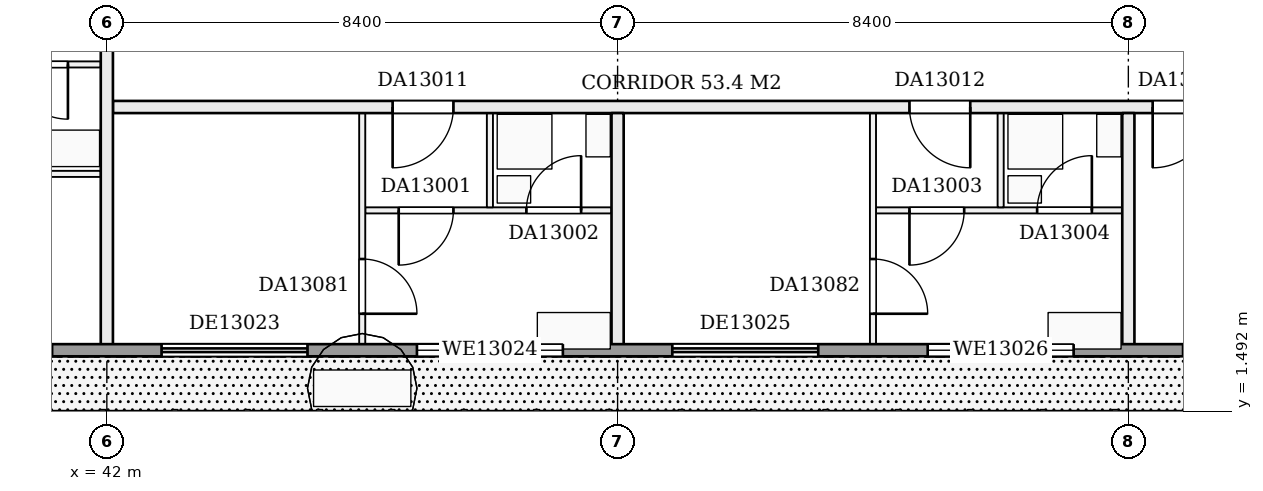
"""IFC4 building model, lengths in metres.
Left out: names, types, materials, properties, quantities, classifications, styles, units other than length and angle.
Written with IfcOpenShell. Run it as: python <this file> out.ifc"""

import sys

from ifc_helpers import new_model, si_unit, direction, frame, frame_2d, origin, place, context, subcontext, project, spatial, rectangle, extrude, element, fill, save


model = new_model("IFC4")
c1 = context("Model", 3, precision=1e-05, world=origin(), true_north=direction((0.0, 1.0)))
c2 = subcontext(c1, "Body", "Model", "MODEL_VIEW")
j1 = project(units=[si_unit("LENGTHUNIT", "METRE"), si_unit("PLANEANGLEUNIT", "RADIAN")], contexts=[c1])
p1 = place(None, origin())
s1 = spatial("IfcSite", under=j1, at=p1, CompositionType="ELEMENT")
p2 = place(p1, origin())
s2 = spatial("IfcBuilding", under=s1, at=p2, CompositionType="ELEMENT")
p3 = place(p2, frame((0.0, 0.0, 56.7)))
s3 = spatial("IfcBuildingStorey", under=s2, at=p3, CompositionType="ELEMENT", Elevation=56.7)
p4 = place(p3, frame((46.25, 4.8, 0.0), z_axis=(0.0, 0.0, 1.0), x_axis=(1.0, 0.0, 0.0)))
e1 = element("IfcWall", 1, at=p4, inside=s3, PredefinedType="PARTITIONING", context=c2, shape_type="SweptSolid", body=[
    extrude(rectangle(XDim=4.05, YDim=0.1, at=frame_2d((2.025, 0.0))), origin(), (0.0, 0.0, 1.0), 3.22),
])
p5 = place(p4, frame((0.55, 0.0, 0.0)))
e2 = element("IfcOpeningElement", 2, at=p5, cuts=e1, PredefinedType="OPENING", context=c2, shape_type="SweptSolid", body=[
    extrude(rectangle(XDim=0.9, YDim=2.1, at=frame_2d((0.45, 1.05))), frame((0.0, 0.06, 0.0), z_axis=(0.0, -1.0, 0.0), x_axis=(1.0, 0.0, 0.0)), (0.0, 0.0, 1.0), 0.12),
])
p6 = place(p4, frame((2.65, 0.0, 0.0)))
e3 = element("IfcOpeningElement", 3, at=p6, cuts=e1, PredefinedType="OPENING", context=c2, shape_type="SweptSolid", body=[
    extrude(rectangle(XDim=0.9, YDim=2.1, at=frame_2d((0.45, 1.05))), frame((0.0, 0.06, 0.0), z_axis=(0.0, -1.0, 0.0), x_axis=(1.0, 0.0, 0.0)), (0.0, 0.0, 1.0), 0.12),
])
p7 = place(p3, frame((54.65, 4.8, 0.0), z_axis=(0.0, 0.0, 1.0), x_axis=(1.0, 0.0, 0.0)))
e4 = element("IfcWall", 4, at=p7, inside=s3, PredefinedType="PARTITIONING", context=c2, shape_type="SweptSolid", body=[
    extrude(rectangle(XDim=4.05, YDim=0.1, at=frame_2d((2.025, 0.0))), origin(), (0.0, 0.0, 1.0), 3.22),
])
p8 = place(p7, frame((0.55, 0.0, 0.0)))
e5 = element("IfcOpeningElement", 5, at=p8, cuts=e4, PredefinedType="OPENING", context=c2, shape_type="SweptSolid", body=[
    extrude(rectangle(XDim=0.9, YDim=2.1, at=frame_2d((0.45, 1.05))), frame((0.0, 0.06, 0.0), z_axis=(0.0, -1.0, 0.0), x_axis=(1.0, 0.0, 0.0)), (0.0, 0.0, 1.0), 0.12),
])
p9 = place(p7, frame((2.65, 0.0, 0.0)))
e6 = element("IfcOpeningElement", 6, at=p9, cuts=e4, PredefinedType="OPENING", context=c2, shape_type="SweptSolid", body=[
    extrude(rectangle(XDim=0.9, YDim=2.1, at=frame_2d((0.45, 1.05))), frame((0.0, 0.06, 0.0), z_axis=(0.0, -1.0, 0.0), x_axis=(1.0, 0.0, 0.0)), (0.0, 0.0, 1.0), 0.12),
])
p10 = place(p3, frame((37.9, 5.4, 0.0), z_axis=(0.0, 0.0, 1.0), x_axis=(1.0, 0.0, 0.0)))
e7 = element("IfcWall", 7, at=p10, inside=s3, PredefinedType="PARTITIONING", context=c2, shape_type="SweptSolid", body=[
    extrude(rectangle(XDim=4.0, YDim=0.1, at=frame_2d((2.0, 0.0))), origin(), (0.0, 0.0, 1.0), 3.22),
])
p11 = place(p10, frame((1.5, 0.0, 0.0)))
e8 = element("IfcOpeningElement", 8, at=p11, cuts=e7, PredefinedType="OPENING", context=c2, shape_type="SweptSolid", body=[
    extrude(rectangle(XDim=0.9, YDim=2.1, at=frame_2d((0.45, 1.05))), frame((0.0, 0.06, 0.0), z_axis=(0.0, -1.0, 0.0), x_axis=(1.0, 0.0, 0.0)), (0.0, 0.0, 1.0), 0.12),
])
p12 = place(p3, frame((42.1, 6.5, 0.0), z_axis=(0.0, 0.0, 1.0), x_axis=(1.0, 0.0, 0.0)))
e9 = element("IfcWall", 9, at=p12, inside=s3, PredefinedType="PARTITIONING", context=c2, shape_type="SweptSolid", body=[
    extrude(rectangle(XDim=18.7, YDim=0.2, at=frame_2d((9.35, 0.0))), origin(), (0.0, 0.0, 1.0), 3.22),
])
p13 = place(p12, frame((4.6, 0.0, 0.0)))
e10 = element("IfcOpeningElement", 10, at=p13, cuts=e9, PredefinedType="OPENING", context=c2, shape_type="SweptSolid", body=[
    extrude(rectangle(XDim=1.0, YDim=2.1, at=frame_2d((0.5, 1.05))), frame((0.0, 0.11, 0.0), z_axis=(0.0, -1.0, 0.0), x_axis=(1.0, 0.0, 0.0)), (0.0, 0.0, 1.0), 0.22),
])
p14 = place(p12, frame((13.1, 0.0, 0.0)))
e11 = element("IfcOpeningElement", 11, at=p14, cuts=e9, PredefinedType="OPENING", context=c2, shape_type="SweptSolid", body=[
    extrude(rectangle(XDim=1.0, YDim=2.1, at=frame_2d((0.5, 1.05))), frame((0.0, 0.11, 0.0), z_axis=(0.0, -1.0, 0.0), x_axis=(1.0, 0.0, 0.0)), (0.0, 0.0, 1.0), 0.22),
])
p15 = place(p12, frame((17.1, 0.0, 0.0)))
e12 = element("IfcOpeningElement", 12, at=p15, cuts=e9, PredefinedType="OPENING", context=c2, shape_type="SweptSolid", body=[
    extrude(rectangle(XDim=1.0, YDim=2.1, at=frame_2d((0.5, 1.05))), frame((0.0, 0.11, 0.0), z_axis=(0.0, -1.0, 0.0), x_axis=(1.0, 0.0, 0.0)), (0.0, 0.0, 1.0), 0.22),
])
p16 = place(p3, frame((37.9, 7.2, 0.0), z_axis=(0.0, 0.0, 1.0), x_axis=(1.0, 0.0, 0.0)))
e13 = element("IfcWall", 13, at=p16, inside=s3, PredefinedType="PARTITIONING", context=c2, shape_type="SweptSolid", body=[
    extrude(rectangle(XDim=4.0, YDim=0.1, at=frame_2d((2.0, 0.0))), origin(), (0.0, 0.0, 1.0), 3.22),
])
p17 = place(p16, frame((0.4, 0.0, 0.0)))
e14 = element("IfcOpeningElement", 14, at=p17, cuts=e13, PredefinedType="OPENING", context=c2, shape_type="SweptSolid", body=[
    extrude(rectangle(XDim=0.9, YDim=2.1, at=frame_2d((0.45, 1.05))), frame((0.0, 0.06, 0.0), z_axis=(0.0, -1.0, 0.0), x_axis=(1.0, 0.0, 0.0)), (0.0, 0.0, 1.0), 0.12),
])
p18 = place(p16, frame((2.56, 0.0, 0.0)))
e15 = element("IfcOpeningElement", 15, at=p18, cuts=e13, PredefinedType="OPENING", context=c2, shape_type="SweptSolid", body=[
    extrude(rectangle(XDim=0.9, YDim=2.1, at=frame_2d((0.45, 1.05))), frame((0.0, 0.06, 0.0), z_axis=(0.0, -1.0, 0.0), x_axis=(1.0, 0.0, 0.0)), (0.0, 0.0, 1.0), 0.12),
])
p19 = place(p3, frame((42.0, 2.5, 0.0), z_axis=(0.0, 0.0, 1.0), x_axis=(0.0, 1.0, 0.0)))
e16 = element("IfcWall", 16, at=p19, inside=s3, PredefinedType="PARTITIONING", context=c2, shape_type="SweptSolid", body=[
    extrude(rectangle(XDim=5.9, YDim=0.2, at=frame_2d((2.95, 0.0))), origin(), (0.0, 0.0, 1.0), 3.22),
])
p20 = place(p3, frame((46.2, 2.5, 0.0), z_axis=(0.0, 0.0, 1.0), x_axis=(0.0, 1.0, 0.0)))
e17 = element("IfcWall", 17, at=p20, inside=s3, PredefinedType="PARTITIONING", context=c2, shape_type="SweptSolid", body=[
    extrude(rectangle(XDim=3.9, YDim=0.1, at=frame_2d((1.95, 0.0))), origin(), (0.0, 0.0, 1.0), 3.22),
])
p21 = place(p20, frame((0.6, 0.0, 0.0)))
e18 = element("IfcOpeningElement", 18, at=p21, cuts=e17, PredefinedType="OPENING", context=c2, shape_type="SweptSolid", body=[
    extrude(rectangle(XDim=0.9, YDim=2.1, at=frame_2d((0.45, 1.05))), frame((0.0, 0.06, 0.0), z_axis=(0.0, -1.0, 0.0), x_axis=(1.0, 0.0, 0.0)), (0.0, 0.0, 1.0), 0.12),
])
p22 = place(p3, frame((48.3, 4.85, 0.0), z_axis=(0.0, 0.0, 1.0), x_axis=(0.0, 1.0, 0.0)))
e19 = element("IfcWall", 19, at=p22, inside=s3, PredefinedType="PARTITIONING", context=c2, shape_type="SweptSolid", body=[
    extrude(rectangle(XDim=1.55, YDim=0.1, at=frame_2d((0.775, 0.0))), origin(), (0.0, 0.0, 1.0), 3.22),
])
p23 = place(p3, frame((50.4, 2.5, 0.0), z_axis=(0.0, 0.0, 1.0), x_axis=(0.0, 1.0, 0.0)))
e20 = element("IfcWall", 20, at=p23, inside=s3, PredefinedType="PARTITIONING", context=c2, shape_type="SweptSolid", body=[
    extrude(rectangle(XDim=3.9, YDim=0.2, at=frame_2d((1.95, 0.0))), origin(), (0.0, 0.0, 1.0), 3.22),
])
p24 = place(p3, frame((54.6, 2.5, 0.0), z_axis=(0.0, 0.0, 1.0), x_axis=(0.0, 1.0, 0.0)))
e21 = element("IfcWall", 21, at=p24, inside=s3, PredefinedType="PARTITIONING", context=c2, shape_type="SweptSolid", body=[
    extrude(rectangle(XDim=3.9, YDim=0.1, at=frame_2d((1.95, 0.0))), origin(), (0.0, 0.0, 1.0), 3.22),
])
p25 = place(p24, frame((0.6, 0.0, 0.0)))
e22 = element("IfcOpeningElement", 22, at=p25, cuts=e21, PredefinedType="OPENING", context=c2, shape_type="SweptSolid", body=[
    extrude(rectangle(XDim=0.9, YDim=2.1, at=frame_2d((0.45, 1.05))), frame((0.0, 0.06, 0.0), z_axis=(0.0, -1.0, 0.0), x_axis=(1.0, 0.0, 0.0)), (0.0, 0.0, 1.0), 0.12),
])
p26 = place(p3, frame((56.7, 4.85, 0.0), z_axis=(0.0, 0.0, 1.0), x_axis=(0.0, 1.0, 0.0)))
e23 = element("IfcWall", 23, at=p26, inside=s3, PredefinedType="PARTITIONING", context=c2, shape_type="SweptSolid", body=[
    extrude(rectangle(XDim=1.55, YDim=0.1, at=frame_2d((0.775, 0.0))), origin(), (0.0, 0.0, 1.0), 3.22),
])
p27 = place(p3, frame((58.8, 2.5, 0.0), z_axis=(0.0, 0.0, 1.0), x_axis=(0.0, 1.0, 0.0)))
e24 = element("IfcWall", 24, at=p27, inside=s3, PredefinedType="PARTITIONING", context=c2, shape_type="SweptSolid", body=[
    extrude(rectangle(XDim=3.9, YDim=0.2, at=frame_2d((1.95, 0.0))), origin(), (0.0, 0.0, 1.0), 3.22),
])
p28 = place(p3, frame((4.8, 2.5, 0.0), z_axis=(0.0, 0.0, 1.0), x_axis=(1.0, 0.0, 0.0)))
e25 = element("IfcWall", 25, at=p28, inside=s3, PredefinedType="SOLIDWALL", context=c2, shape_type="SweptSolid", body=[
    extrude(rectangle(XDim=57.6, YDim=0.2, at=frame_2d((28.8, 0.0))), origin(), (0.0, 0.0, 1.0), 3.22),
])
p29 = place(p28, frame((0.3, 0.0, 0.0)))
e26 = element("IfcOpeningElement", 26, at=p29, cuts=e25, PredefinedType="OPENING", context=c2, shape_type="SweptSolid", body=[
    extrude(rectangle(XDim=2.4, YDim=2.2, at=frame_2d((1.2, 1.1))), frame((0.0, 0.11, 0.0), z_axis=(0.0, -1.0, 0.0), x_axis=(1.0, 0.0, 0.0)), (0.0, 0.0, 1.0), 0.22),
])
p30 = place(p28, frame((4.5, 0.0, 0.0)))
e27 = element("IfcOpeningElement", 27, at=p30, cuts=e25, PredefinedType="OPENING", context=c2, shape_type="SweptSolid", body=[
    extrude(rectangle(XDim=2.4, YDim=2.2, at=frame_2d((1.2, 1.1))), frame((0.0, 0.11, 0.0), z_axis=(0.0, -1.0, 0.0), x_axis=(1.0, 0.0, 0.0)), (0.0, 0.0, 1.0), 0.22),
])
p31 = place(p28, frame((8.7, 0.0, 0.0)))
e28 = element("IfcOpeningElement", 28, at=p31, cuts=e25, PredefinedType="OPENING", context=c2, shape_type="SweptSolid", body=[
    extrude(rectangle(XDim=2.4, YDim=2.2, at=frame_2d((1.2, 1.1))), frame((0.0, 0.11, 0.0), z_axis=(0.0, -1.0, 0.0), x_axis=(1.0, 0.0, 0.0)), (0.0, 0.0, 1.0), 0.22),
])
p32 = place(p28, frame((12.9, 0.0, 0.0)))
e29 = element("IfcOpeningElement", 29, at=p32, cuts=e25, PredefinedType="OPENING", context=c2, shape_type="SweptSolid", body=[
    extrude(rectangle(XDim=2.4, YDim=2.2, at=frame_2d((1.2, 1.1))), frame((0.0, 0.11, 0.0), z_axis=(0.0, -1.0, 0.0), x_axis=(1.0, 0.0, 0.0)), (0.0, 0.0, 1.0), 0.22),
])
p33 = place(p28, frame((17.1, 0.0, 0.9)))
e30 = element("IfcOpeningElement", 30, at=p33, cuts=e25, PredefinedType="OPENING", context=c2, shape_type="SweptSolid", body=[
    extrude(rectangle(XDim=2.4, YDim=1.5, at=frame_2d((1.2, 0.75))), frame((0.0, 0.11, 0.0), z_axis=(0.0, -1.0, 0.0), x_axis=(1.0, 0.0, 0.0)), (0.0, 0.0, 1.0), 0.22),
])
p34 = place(p28, frame((21.3, 0.0, 0.0)))
e31 = element("IfcOpeningElement", 31, at=p34, cuts=e25, PredefinedType="OPENING", context=c2, shape_type="SweptSolid", body=[
    extrude(rectangle(XDim=2.4, YDim=2.2, at=frame_2d((1.2, 1.1))), frame((0.0, 0.11, 0.0), z_axis=(0.0, -1.0, 0.0), x_axis=(1.0, 0.0, 0.0)), (0.0, 0.0, 1.0), 0.22),
])
p35 = place(p28, frame((25.5, 0.0, 0.0)))
e32 = element("IfcOpeningElement", 32, at=p35, cuts=e25, PredefinedType="OPENING", context=c2, shape_type="SweptSolid", body=[
    extrude(rectangle(XDim=2.4, YDim=2.2, at=frame_2d((1.2, 1.1))), frame((0.0, 0.11, 0.0), z_axis=(0.0, -1.0, 0.0), x_axis=(1.0, 0.0, 0.0)), (0.0, 0.0, 1.0), 0.22),
])
p36 = place(p28, frame((29.7, 0.0, 0.9)))
e33 = element("IfcOpeningElement", 33, at=p36, cuts=e25, PredefinedType="OPENING", context=c2, shape_type="SweptSolid", body=[
    extrude(rectangle(XDim=2.4, YDim=1.5, at=frame_2d((1.2, 0.75))), frame((0.0, 0.11, 0.0), z_axis=(0.0, -1.0, 0.0), x_axis=(1.0, 0.0, 0.0)), (0.0, 0.0, 1.0), 0.22),
])
p37 = place(p28, frame((33.9, 0.0, 0.0)))
e34 = element("IfcOpeningElement", 34, at=p37, cuts=e25, PredefinedType="OPENING", context=c2, shape_type="SweptSolid", body=[
    extrude(rectangle(XDim=2.4, YDim=2.2, at=frame_2d((1.2, 1.1))), frame((0.0, 0.11, 0.0), z_axis=(0.0, -1.0, 0.0), x_axis=(1.0, 0.0, 0.0)), (0.0, 0.0, 1.0), 0.22),
])
p38 = place(p28, frame((38.1, 0.0, 0.0)))
e35 = element("IfcOpeningElement", 35, at=p38, cuts=e25, PredefinedType="OPENING", context=c2, shape_type="SweptSolid", body=[
    extrude(rectangle(XDim=2.4, YDim=2.2, at=frame_2d((1.2, 1.1))), frame((0.0, 0.11, 0.0), z_axis=(0.0, -1.0, 0.0), x_axis=(1.0, 0.0, 0.0)), (0.0, 0.0, 1.0), 0.22),
])
p39 = place(p28, frame((42.3, 0.0, 0.9)))
e36 = element("IfcOpeningElement", 36, at=p39, cuts=e25, PredefinedType="OPENING", context=c2, shape_type="SweptSolid", body=[
    extrude(rectangle(XDim=2.4, YDim=1.5, at=frame_2d((1.2, 0.75))), frame((0.0, 0.11, 0.0), z_axis=(0.0, -1.0, 0.0), x_axis=(1.0, 0.0, 0.0)), (0.0, 0.0, 1.0), 0.22),
])
p40 = place(p28, frame((46.5, 0.0, 0.0)))
e37 = element("IfcOpeningElement", 37, at=p40, cuts=e25, PredefinedType="OPENING", context=c2, shape_type="SweptSolid", body=[
    extrude(rectangle(XDim=2.4, YDim=2.2, at=frame_2d((1.2, 1.1))), frame((0.0, 0.11, 0.0), z_axis=(0.0, -1.0, 0.0), x_axis=(1.0, 0.0, 0.0)), (0.0, 0.0, 1.0), 0.22),
])
p41 = place(p28, frame((50.7, 0.0, 0.9)))
e38 = element("IfcOpeningElement", 38, at=p41, cuts=e25, PredefinedType="OPENING", context=c2, shape_type="SweptSolid", body=[
    extrude(rectangle(XDim=2.4, YDim=1.5, at=frame_2d((1.2, 0.75))), frame((0.0, 0.11, 0.0), z_axis=(0.0, -1.0, 0.0), x_axis=(1.0, 0.0, 0.0)), (0.0, 0.0, 1.0), 0.22),
])
p42 = place(p28, frame((54.9, 0.0, 0.9)))
e39 = element("IfcOpeningElement", 39, at=p42, cuts=e25, PredefinedType="OPENING", context=c2, shape_type="SweptSolid", body=[
    extrude(rectangle(XDim=2.4, YDim=1.5, at=frame_2d((1.2, 0.75))), frame((0.0, 0.11, 0.0), z_axis=(0.0, -1.0, 0.0), x_axis=(1.0, 0.0, 0.0)), (0.0, 0.0, 1.0), 0.22),
])
p43 = place(p5, frame((0.9, 0.0, 0.0), z_axis=(0.0, 0.0, 1.0), x_axis=(-1.0, 0.0, 0.0)))
e40 = element("IfcDoor", 40, at=p43, inside=s3, OperationType="SINGLE_SWING_RIGHT", PredefinedType="DOOR", context=c2, shape_type="SweptSolid", body=[
    extrude(rectangle(XDim=0.9, YDim=2.1, at=frame_2d((0.45, 1.05))), frame((0.0, 0.025, 0.0), z_axis=(0.0, -1.0, 0.0), x_axis=(1.0, 0.0, 0.0)), (0.0, 0.0, 1.0), 0.05),
])
fill(e2, e40)
p44 = place(p6, origin())
e41 = element("IfcDoor", 41, at=p44, inside=s3, OperationType="SINGLE_SWING_RIGHT", PredefinedType="DOOR", context=c2, shape_type="SweptSolid", body=[
    extrude(rectangle(XDim=0.9, YDim=2.1, at=frame_2d((0.45, 1.05))), frame((0.0, 0.025, 0.0), z_axis=(0.0, -1.0, 0.0), x_axis=(1.0, 0.0, 0.0)), (0.0, 0.0, 1.0), 0.05),
])
fill(e3, e41)
p45 = place(p8, frame((0.9, 0.0, 0.0), z_axis=(0.0, 0.0, 1.0), x_axis=(-1.0, 0.0, 0.0)))
e42 = element("IfcDoor", 42, at=p45, inside=s3, OperationType="SINGLE_SWING_RIGHT", PredefinedType="DOOR", context=c2, shape_type="SweptSolid", body=[
    extrude(rectangle(XDim=0.9, YDim=2.1, at=frame_2d((0.45, 1.05))), frame((0.0, 0.025, 0.0), z_axis=(0.0, -1.0, 0.0), x_axis=(1.0, 0.0, 0.0)), (0.0, 0.0, 1.0), 0.05),
])
fill(e5, e42)
p46 = place(p9, origin())
e43 = element("IfcDoor", 43, at=p46, inside=s3, OperationType="SINGLE_SWING_RIGHT", PredefinedType="DOOR", context=c2, shape_type="SweptSolid", body=[
    extrude(rectangle(XDim=0.9, YDim=2.1, at=frame_2d((0.45, 1.05))), frame((0.0, 0.025, 0.0), z_axis=(0.0, -1.0, 0.0), x_axis=(1.0, 0.0, 0.0)), (0.0, 0.0, 1.0), 0.05),
])
fill(e6, e43)
p47 = place(p13, frame((1.0, 0.0, 0.0), z_axis=(0.0, 0.0, 1.0), x_axis=(-1.0, 0.0, 0.0)))
e44 = element("IfcDoor", 44, at=p47, inside=s3, OperationType="SINGLE_SWING_RIGHT", PredefinedType="DOOR", context=c2, shape_type="SweptSolid", body=[
    extrude(rectangle(XDim=1.0, YDim=2.1, at=frame_2d((0.5, 1.05))), frame((0.0, 0.025, 0.0), z_axis=(0.0, -1.0, 0.0), x_axis=(1.0, 0.0, 0.0)), (0.0, 0.0, 1.0), 0.05),
])
fill(e10, e44)
p48 = place(p14, frame((1.0, 0.0, 0.0), z_axis=(0.0, 0.0, 1.0), x_axis=(-1.0, 0.0, 0.0)))
e45 = element("IfcDoor", 45, at=p48, inside=s3, OperationType="SINGLE_SWING_LEFT", PredefinedType="DOOR", context=c2, shape_type="SweptSolid", body=[
    extrude(rectangle(XDim=1.0, YDim=2.1, at=frame_2d((0.5, 1.05))), frame((0.0, 0.025, 0.0), z_axis=(0.0, -1.0, 0.0), x_axis=(1.0, 0.0, 0.0)), (0.0, 0.0, 1.0), 0.05),
])
fill(e11, e45)
p49 = place(p15, frame((1.0, 0.0, 0.0), z_axis=(0.0, 0.0, 1.0), x_axis=(-1.0, 0.0, 0.0)))
e46 = element("IfcDoor", 46, at=p49, inside=s3, OperationType="SINGLE_SWING_RIGHT", PredefinedType="DOOR", context=c2, shape_type="SweptSolid", body=[
    extrude(rectangle(XDim=1.0, YDim=2.1, at=frame_2d((0.5, 1.05))), frame((0.0, 0.025, 0.0), z_axis=(0.0, -1.0, 0.0), x_axis=(1.0, 0.0, 0.0)), (0.0, 0.0, 1.0), 0.05),
])
fill(e12, e46)
p50 = place(p18, frame((0.9, 0.0, 0.0), z_axis=(0.0, 0.0, 1.0), x_axis=(-1.0, 0.0, 0.0)))
e47 = element("IfcDoor", 47, at=p50, inside=s3, OperationType="SINGLE_SWING_LEFT", PredefinedType="DOOR", context=c2, shape_type="SweptSolid", body=[
    extrude(rectangle(XDim=0.9, YDim=2.1, at=frame_2d((0.45, 1.05))), frame((0.0, 0.025, 0.0), z_axis=(0.0, -1.0, 0.0), x_axis=(1.0, 0.0, 0.0)), (0.0, 0.0, 1.0), 0.05),
])
fill(e15, e47)
p51 = place(p21, frame((0.9, 0.0, 0.0), z_axis=(0.0, 0.0, 1.0), x_axis=(-1.0, 0.0, 0.0)))
e48 = element("IfcDoor", 48, at=p51, inside=s3, OperationType="SINGLE_SWING_RIGHT", PredefinedType="DOOR", context=c2, shape_type="SweptSolid", body=[
    extrude(rectangle(XDim=0.9, YDim=2.1, at=frame_2d((0.45, 1.05))), frame((0.0, 0.025, 0.0), z_axis=(0.0, -1.0, 0.0), x_axis=(1.0, 0.0, 0.0)), (0.0, 0.0, 1.0), 0.05),
])
fill(e18, e48)
p52 = place(p25, frame((0.9, 0.0, 0.0), z_axis=(0.0, 0.0, 1.0), x_axis=(-1.0, 0.0, 0.0)))
e49 = element("IfcDoor", 49, at=p52, inside=s3, OperationType="SINGLE_SWING_RIGHT", PredefinedType="DOOR", context=c2, shape_type="SweptSolid", body=[
    extrude(rectangle(XDim=0.9, YDim=2.1, at=frame_2d((0.45, 1.05))), frame((0.0, 0.025, 0.0), z_axis=(0.0, -1.0, 0.0), x_axis=(1.0, 0.0, 0.0)), (0.0, 0.0, 1.0), 0.05),
])
fill(e22, e49)
p53 = place(p38, origin())
e50 = element("IfcDoor", 50, at=p53, inside=s3, OperationType="DOUBLE_DOOR_SLIDING", PredefinedType="DOOR", context=c2, shape_type="SweptSolid", body=[
    extrude(rectangle(XDim=2.4, YDim=2.2, at=frame_2d((1.2, 1.1))), frame((0.0, 0.025, 0.0), z_axis=(0.0, -1.0, 0.0), x_axis=(1.0, 0.0, 0.0)), (0.0, 0.0, 1.0), 0.05),
])
fill(e35, e50)
p54 = place(p39, origin())
e51 = element("IfcWindow", 51, at=p54, inside=s3, PartitioningType="SINGLE_PANEL", PredefinedType="WINDOW", context=c2, shape_type="SweptSolid", body=[
    extrude(rectangle(XDim=2.4, YDim=1.5, at=frame_2d((1.2, 0.75))), frame((0.0, 0.03, 0.0), z_axis=(0.0, -1.0, 0.0), x_axis=(1.0, 0.0, 0.0)), (0.0, 0.0, 1.0), 0.06),
])
fill(e36, e51)
p55 = place(p40, origin())
e52 = element("IfcDoor", 52, at=p55, inside=s3, OperationType="DOUBLE_DOOR_SLIDING", PredefinedType="DOOR", context=c2, shape_type="SweptSolid", body=[
    extrude(rectangle(XDim=2.4, YDim=2.2, at=frame_2d((1.2, 1.1))), frame((0.0, 0.025, 0.0), z_axis=(0.0, -1.0, 0.0), x_axis=(1.0, 0.0, 0.0)), (0.0, 0.0, 1.0), 0.05),
])
fill(e37, e52)
p56 = place(p41, origin())
e53 = element("IfcWindow", 53, at=p56, inside=s3, PartitioningType="SINGLE_PANEL", PredefinedType="WINDOW", context=c2, shape_type="SweptSolid", body=[
    extrude(rectangle(XDim=2.4, YDim=1.5, at=frame_2d((1.2, 0.75))), frame((0.0, 0.03, 0.0), z_axis=(0.0, -1.0, 0.0), x_axis=(1.0, 0.0, 0.0)), (0.0, 0.0, 1.0), 0.06),
])
fill(e38, e53)
save(model, sys.argv[1])
